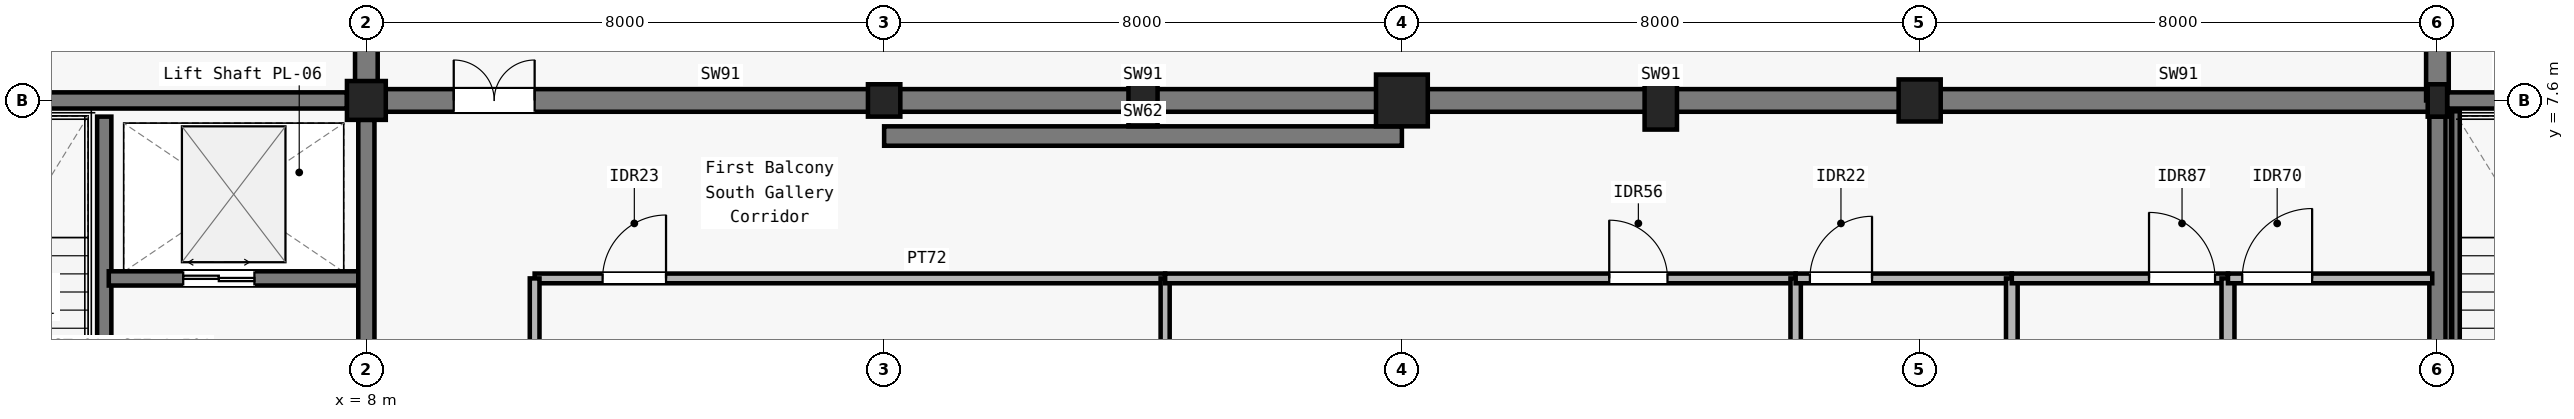
"""IFC4 building model, lengths in metres.
Left out: names, types, materials, properties, quantities, classifications, styles, units other than length and angle.
Written with IfcOpenShell. Run it as: python <this file> out.ifc"""

import sys

from ifc_helpers import new_model, si_unit, direction, frame, frame_2d, origin, origin_2d, place, context, subcontext, project, spatial, rectangle, circle, i_section, extrude, element, fill, save


model = new_model("IFC4")
c1 = context("Model", 3, precision=1e-05, world=origin(), true_north=direction((0.0, 1.0)))
c2 = subcontext(c1, "Body", "Model", "MODEL_VIEW")
j1 = project(units=[si_unit("LENGTHUNIT", "METRE"), si_unit("PLANEANGLEUNIT", "RADIAN")], contexts=[c1])
p1 = place(None, origin())
s1 = spatial("IfcSite", under=j1, at=p1, CompositionType="ELEMENT")
p2 = place(p1, origin())
s2 = spatial("IfcBuilding", under=s1, at=p2, CompositionType="ELEMENT")
p3 = place(p2, frame((0.0, 0.0, 5.4)))
s3 = spatial("IfcBuildingStorey", under=s2, at=p3, CompositionType="ELEMENT", Elevation=5.4)
p4 = place(p3, frame((8.0, 7.6, 0.0), z_axis=(0.0, 0.0, 1.0), x_axis=(1.0, 0.0, 0.0)))
e1 = element("IfcColumn", 1, at=p4, inside=s3, PredefinedType="COLUMN", context=c2, shape_type="SweptSolid", body=[
    extrude(rectangle(XDim=0.6, YDim=0.6, at=origin_2d()), origin(), (0.0, 0.0, 1.0), 4.8),
])
p5 = place(p3, frame((16.0, 7.6, 0.0), z_axis=(0.0, 0.0, 1.0), x_axis=(1.0, 0.0, 0.0)))
e2 = element("IfcColumn", 2, at=p5, inside=s3, PredefinedType="COLUMN", context=c2, shape_type="SweptSolid", body=[
    extrude(rectangle(XDim=0.5, YDim=0.5, at=origin_2d()), origin(), (0.0, 0.0, 1.0), 4.8),
])
p6 = place(p3, frame((24.0, 7.6, 0.0), z_axis=(0.0, 0.0, 1.0), x_axis=(1.0, 0.0, 0.0)))
e3 = element("IfcColumn", 3, at=p6, inside=s3, PredefinedType="COLUMN", context=c2, shape_type="SweptSolid", body=[
    extrude(circle(Radius=0.4, at=origin_2d()), origin(), (0.0, 0.0, 1.0), 4.8),
])
p7 = place(p3, frame((32.0, 7.6, 0.0), z_axis=(0.0, 0.0, 1.0), x_axis=(1.0, 0.0, 0.0)))
e4 = element("IfcColumn", 4, at=p7, inside=s3, PredefinedType="COLUMN", context=c2, shape_type="SweptSolid", body=[
    extrude(circle(Radius=0.325, at=origin_2d()), origin(), (0.0, 0.0, 1.0), 4.8),
])
p8 = place(p3, frame((40.0, 7.6, 0.0), z_axis=(0.0, 0.0, 1.0), x_axis=(1.0, 0.0, 0.0)))
e5 = element("IfcColumn", 5, at=p8, inside=s3, PredefinedType="COLUMN", context=c2, shape_type="SweptSolid", body=[
    extrude(i_section(OverallWidth=0.3, OverallDepth=0.5, WebThickness=0.014, FlangeThickness=0.028, FilletRadius=0.027, at=origin_2d()), origin(), (0.0, 0.0, 1.0), 4.8),
])
p9 = place(p3, frame((20.0, 7.6, 0.0), z_axis=(0.0, 0.0, 1.0), x_axis=(1.0, 0.0, 0.0)))
e6 = element("IfcColumn", 6, at=p9, inside=s3, PredefinedType="PILASTER", context=c2, shape_type="SweptSolid", body=[
    extrude(rectangle(XDim=0.45, YDim=0.8, at=origin_2d()), origin(), (0.0, 0.0, 1.0), 4.8),
])
p10 = place(p3, frame((28.0, 7.6, 0.0), z_axis=(0.0, 0.0, 1.0), x_axis=(1.0, 0.0, 0.0)))
e7 = element("IfcColumn", 7, at=p10, inside=s3, PredefinedType="PILASTER", context=c2, shape_type="SweptSolid", body=[
    extrude(rectangle(XDim=0.5, YDim=0.9, at=origin_2d()), origin(), (0.0, 0.0, 1.0), 4.8),
])
p11 = place(p3, frame((8.0, 7.6, 0.0), z_axis=(0.0, 0.0, 1.0), x_axis=(1.0, 0.0, 0.0)))
e8 = element("IfcWall", 8, at=p11, inside=s3, PredefinedType="SHEAR", context=c2, shape_type="SweptSolid", body=[
    extrude(rectangle(XDim=8.0, YDim=0.35, at=frame_2d((4.0, 0.0))), origin(), (0.0, 0.0, 1.0), 4.51),
])
p12 = place(p11, frame((1.35, 0.0, 0.0)))
e9 = element("IfcOpeningElement", 9, at=p12, cuts=e8, PredefinedType="OPENING", context=c2, shape_type="SweptSolid", body=[
    extrude(rectangle(XDim=1.25, YDim=2.2, at=frame_2d((0.625, 1.1))), frame((0.0, 0.185, 0.0), z_axis=(0.0, -1.0, 0.0), x_axis=(1.0, 0.0, 0.0)), (0.0, 0.0, 1.0), 0.37),
])
for number, where, z_axis, x_axis in (
    (10, (16.0, 7.6, 0.0), (0.0, 0.0, 1.0), (1.0, 0.0, 0.0)),
    (11, (24.0, 7.6, 0.0), (0.0, 0.0, 1.0), (1.0, 0.0, 0.0)),
    (12, (32.0, 7.6, 0.0), (0.0, 0.0, 1.0), (1.0, 0.0, 0.0)),
):
    element("IfcWall", number, at=place(p3, frame(where, z_axis=z_axis, x_axis=x_axis)), inside=s3, PredefinedType="SHEAR", context=c2, shape_type="SweptSolid", body=[
        extrude(rectangle(XDim=8.0, YDim=0.35, at=frame_2d((4.0, 0.0))), origin(), (0.0, 0.0, 1.0), 4.51),
    ])
for number, where, z_axis, x_axis in (
    (13, (8.0, 7.6, 0.0), (0.0, 0.0, 1.0), (0.0, 1.0, 0.0)),
    (14, (40.0, 7.6, 0.0), (0.0, 0.0, 1.0), (0.0, 1.0, 0.0)),
):
    element("IfcWall", number, at=place(p3, frame(where, z_axis=z_axis, x_axis=x_axis)), inside=s3, PredefinedType="SHEAR", context=c2, shape_type="SweptSolid", body=[
        extrude(rectangle(XDim=7.6, YDim=0.35, at=frame_2d((3.8, 0.0))), origin(), (0.0, 0.0, 1.0), 4.51),
    ])
p13 = place(p3, frame((16.0, 7.05, 0.0), z_axis=(0.0, 0.0, 1.0), x_axis=(1.0, 0.0, 0.0)))
e15 = element("IfcWall", 15, at=p13, inside=s3, PredefinedType="SHEAR", context=c2, shape_type="SweptSolid", body=[
    extrude(rectangle(XDim=8.0, YDim=0.3, at=frame_2d((4.0, 0.0))), origin(), (0.0, 0.0, 1.0), 4.51),
])
p14 = place(p3, frame((0.25, 7.6, 0.0), z_axis=(0.0, 0.0, 1.0), x_axis=(1.0, 0.0, 0.0)))
e16 = element("IfcWall", 16, at=p14, inside=s3, PredefinedType="SOLIDWALL", context=c2, shape_type="SweptSolid", body=[
    extrude(rectangle(XDim=7.45, YDim=0.25, at=frame_2d((3.725, 0.0))), origin(), (0.0, 0.0, 1.0), 3.76),
])
p15 = place(p3, frame((3.95, 0.25, 0.0), z_axis=(0.0, 0.0, 1.0), x_axis=(0.0, 1.0, 0.0)))
e17 = element("IfcWall", 17, at=p15, inside=s3, PredefinedType="SOLIDWALL", context=c2, shape_type="SweptSolid", body=[
    extrude(rectangle(XDim=7.1, YDim=0.22, at=frame_2d((3.55, 0.0))), origin(), (0.0, 0.0, 1.0), 4.51),
])
p16 = place(p15, frame((0.35, 0.0, 0.0)))
e18 = element("IfcOpeningElement", 18, at=p16, cuts=e17, PredefinedType="OPENING", context=c2, shape_type="SweptSolid", body=[
    extrude(rectangle(XDim=1.2, YDim=2.15, at=frame_2d((0.6, 1.075))), frame((0.0, 0.12, 0.0), z_axis=(0.0, -1.0, 0.0), x_axis=(1.0, 0.0, 0.0)), (0.0, 0.0, 1.0), 0.24),
])
p17 = place(p3, frame((4.02, 4.85, 0.0), z_axis=(0.0, 0.0, 1.0), x_axis=(1.0, 0.0, 0.0)))
e19 = element("IfcWall", 19, at=p17, inside=s3, PredefinedType="SOLIDWALL", context=c2, shape_type="SweptSolid", body=[
    extrude(rectangle(XDim=3.93, YDim=0.22, at=frame_2d((1.965, 0.0))), origin(), (0.0, 0.0, 1.0), 3.885),
])
p18 = place(p17, frame((1.15, 0.0, 0.0)))
e20 = element("IfcOpeningElement", 20, at=p18, cuts=e19, PredefinedType="OPENING", context=c2, shape_type="SweptSolid", body=[
    extrude(rectangle(XDim=1.1, YDim=2.2, at=frame_2d((0.55, 1.1))), frame((0.0, 0.12, 0.0), z_axis=(0.0, -1.0, 0.0), x_axis=(1.0, 0.0, 0.0)), (0.0, 0.0, 1.0), 0.24),
])
p19 = place(p3, frame((8.0, 0.375, 0.0), z_axis=(0.0, 0.0, 1.0), x_axis=(0.0, 1.0, 0.0)))
e21 = element("IfcWall", 21, at=p19, inside=s3, PredefinedType="SOLIDWALL", context=c2, shape_type="SweptSolid", body=[
    extrude(rectangle(XDim=6.925, YDim=0.25, at=frame_2d((3.462, 0.0))), origin(), (0.0, 0.0, 1.0), 3.84),
])
p20 = place(p19, frame((1.975, 0.0, 0.0)))
e22 = element("IfcOpeningElement", 22, at=p20, cuts=e21, PredefinedType="OPENING", context=c2, shape_type="SweptSolid", body=[
    extrude(rectangle(XDim=1.35, YDim=2.2, at=frame_2d((0.675, 1.1))), frame((0.0, 0.135, 0.0), z_axis=(0.0, -1.0, 0.0), x_axis=(1.0, 0.0, 0.0)), (0.0, 0.0, 1.0), 0.27),
])
p21 = place(p3, frame((40.0, 0.25, 0.0), z_axis=(0.0, 0.0, 1.0), x_axis=(0.0, 1.0, 0.0)))
e23 = element("IfcWall", 23, at=p21, inside=s3, PredefinedType="SOLIDWALL", context=c2, shape_type="SweptSolid", body=[
    extrude(rectangle(XDim=7.1, YDim=0.25, at=frame_2d((3.55, 0.0))), origin(), (0.0, 0.0, 1.0), 3.4),
])
p22 = place(p3, frame((40.15, 7.6, 0.0), z_axis=(0.0, 0.0, 1.0), x_axis=(1.0, 0.0, 0.0)))
e24 = element("IfcWall", 24, at=p22, inside=s3, PredefinedType="SOLIDWALL", context=c2, shape_type="SweptSolid", body=[
    extrude(rectangle(XDim=7.77, YDim=0.25, at=frame_2d((3.885, 0.0))), origin(), (0.0, 0.0, 1.0), 3.4),
])
p23 = place(p3, frame((10.6, 4.85, 0.0), z_axis=(0.0, 0.0, 1.0), x_axis=(1.0, 0.0, 0.0)))
e25 = element("IfcWall", 25, at=p23, inside=s3, PredefinedType="PARTITIONING", context=c2, shape_type="SweptSolid", body=[
    extrude(rectangle(XDim=9.742, YDim=0.15, at=frame_2d((4.871, 0.0))), origin(), (0.0, 0.0, 1.0), 3.865),
])
p24 = place(p23, frame((1.05, 0.0, 0.0)))
e26 = element("IfcOpeningElement", 26, at=p24, cuts=e25, PredefinedType="OPENING", context=c2, shape_type="SweptSolid", body=[
    extrude(rectangle(XDim=0.98, YDim=2.05, at=frame_2d((0.49, 1.025))), frame((0.0, 0.085, 0.0), z_axis=(0.0, -1.0, 0.0), x_axis=(1.0, 0.0, 0.0)), (0.0, 0.0, 1.0), 0.17),
])
p25 = place(p3, frame((20.342, 0.08, 0.0), z_axis=(0.0, 0.0, 1.0), x_axis=(0.0, 1.0, 0.0)))
e27 = element("IfcWall", 27, at=p25, inside=s3, PredefinedType="PARTITIONING", context=c2, shape_type="SweptSolid", body=[
    extrude(rectangle(XDim=4.77, YDim=0.14, at=frame_2d((2.385, 0.0))), origin(), (0.0, 0.0, 1.0), 3.76),
])
p26 = place(p3, frame((20.342, 4.85, 0.0), z_axis=(0.0, 0.0, 1.0), x_axis=(1.0, 0.0, 0.0)))
e28 = element("IfcWall", 28, at=p26, inside=s3, PredefinedType="PARTITIONING", context=c2, shape_type="SweptSolid", body=[
    extrude(rectangle(XDim=9.742, YDim=0.15, at=frame_2d((4.871, 0.0))), origin(), (0.0, 0.0, 1.0), 3.84),
])
p27 = place(p26, frame((6.862, 0.0, 0.0)))
e29 = element("IfcOpeningElement", 29, at=p27, cuts=e28, PredefinedType="OPENING", context=c2, shape_type="SweptSolid", body=[
    extrude(rectangle(XDim=0.9, YDim=2.1, at=frame_2d((0.45, 1.05))), frame((0.0, 0.085, 0.0), z_axis=(0.0, -1.0, 0.0), x_axis=(1.0, 0.0, 0.0)), (0.0, 0.0, 1.0), 0.17),
])
p28 = place(p3, frame((30.084, 0.08, 0.0), z_axis=(0.0, 0.0, 1.0), x_axis=(0.0, 1.0, 0.0)))
e30 = element("IfcWall", 30, at=p28, inside=s3, PredefinedType="PARTITIONING", context=c2, shape_type="SweptSolid", body=[
    extrude(rectangle(XDim=4.77, YDim=0.16, at=frame_2d((2.385, 0.0))), origin(), (0.0, 0.0, 1.0), 3.735),
])
p29 = place(p3, frame((30.084, 4.85, 0.0), z_axis=(0.0, 0.0, 1.0), x_axis=(1.0, 0.0, 0.0)))
e31 = element("IfcWall", 31, at=p29, inside=s3, PredefinedType="PARTITIONING", context=c2, shape_type="SweptSolid", body=[
    extrude(rectangle(XDim=3.34, YDim=0.15, at=frame_2d((1.67, 0.0))), origin(), (0.0, 0.0, 1.0), 3.735),
])
p30 = place(p29, frame((0.22, 0.0, 0.0)))
e32 = element("IfcOpeningElement", 32, at=p30, cuts=e31, PredefinedType="OPENING", context=c2, shape_type="SweptSolid", body=[
    extrude(rectangle(XDim=0.96, YDim=2.1, at=frame_2d((0.48, 1.05))), frame((0.0, 0.085, 0.0), z_axis=(0.0, -1.0, 0.0), x_axis=(1.0, 0.0, 0.0)), (0.0, 0.0, 1.0), 0.17),
])
p31 = place(p3, frame((33.424, 0.08, 0.0), z_axis=(0.0, 0.0, 1.0), x_axis=(0.0, 1.0, 0.0)))
e33 = element("IfcWall", 33, at=p31, inside=s3, PredefinedType="PARTITIONING", context=c2, shape_type="SweptSolid", body=[
    extrude(rectangle(XDim=4.77, YDim=0.18, at=frame_2d((2.385, 0.0))), origin(), (0.0, 0.0, 1.0), 3.905),
])
p32 = place(p3, frame((33.424, 4.85, 0.0), z_axis=(0.0, 0.0, 1.0), x_axis=(1.0, 0.0, 0.0)))
e34 = element("IfcWall", 34, at=p32, inside=s3, PredefinedType="PARTITIONING", context=c2, shape_type="SweptSolid", body=[
    extrude(rectangle(XDim=3.34, YDim=0.15, at=frame_2d((1.67, 0.0))), origin(), (0.0, 0.0, 1.0), 3.895),
])
p33 = place(p32, frame((2.12, 0.0, 0.0)))
e35 = element("IfcOpeningElement", 35, at=p33, cuts=e34, PredefinedType="OPENING", context=c2, shape_type="SweptSolid", body=[
    extrude(rectangle(XDim=1.02, YDim=2.1, at=frame_2d((0.51, 1.05))), frame((0.0, 0.085, 0.0), z_axis=(0.0, -1.0, 0.0), x_axis=(1.0, 0.0, 0.0)), (0.0, 0.0, 1.0), 0.17),
])
p34 = place(p3, frame((36.764, 0.08, 0.0), z_axis=(0.0, 0.0, 1.0), x_axis=(0.0, 1.0, 0.0)))
e36 = element("IfcWall", 36, at=p34, inside=s3, PredefinedType="PARTITIONING", context=c2, shape_type="SweptSolid", body=[
    extrude(rectangle(XDim=4.77, YDim=0.2, at=frame_2d((2.385, 0.0))), origin(), (0.0, 0.0, 1.0), 3.905),
])
p35 = place(p3, frame((36.764, 4.85, 0.0), z_axis=(0.0, 0.0, 1.0), x_axis=(1.0, 0.0, 0.0)))
e37 = element("IfcWall", 37, at=p35, inside=s3, PredefinedType="PARTITIONING", context=c2, shape_type="SweptSolid", body=[
    extrude(rectangle(XDim=3.156, YDim=0.15, at=frame_2d((1.578, 0.0))), origin(), (0.0, 0.0, 1.0), 3.685),
])
p36 = place(p35, frame((0.22, 0.0, 0.0)))
e38 = element("IfcOpeningElement", 38, at=p36, cuts=e37, PredefinedType="OPENING", context=c2, shape_type="SweptSolid", body=[
    extrude(rectangle(XDim=1.08, YDim=2.1, at=frame_2d((0.54, 1.05))), frame((0.0, 0.085, 0.0), z_axis=(0.0, -1.0, 0.0), x_axis=(1.0, 0.0, 0.0)), (0.0, 0.0, 1.0), 0.17),
])
p37 = place(p3, frame((10.6, 0.08, 0.0), z_axis=(0.0, 0.0, 1.0), x_axis=(0.0, 1.0, 0.0)))
e39 = element("IfcWall", 39, at=p37, inside=s3, PredefinedType="PARTITIONING", context=c2, shape_type="SweptSolid", body=[
    extrude(rectangle(XDim=4.77, YDim=0.15, at=frame_2d((2.385, 0.0))), origin(), (0.0, 0.0, 1.0), 3.88),
])
p38 = place(p3, frame((40.275, 0.15, 0.0), z_axis=(0.0, 0.0, 1.0), x_axis=(0.0, 1.0, 0.0)))
e40 = element("IfcWall", 40, at=p38, inside=s3, PredefinedType="SOLIDWALL", context=c2, shape_type="SweptSolid", body=[
    extrude(rectangle(XDim=7.3, YDim=0.14, at=frame_2d((3.65, 0.0))), origin(), (0.0, 0.0, 1.0), 4.51),
])
p39 = place(p18, origin())
e41 = element("IfcDoor", 41, at=p39, inside=s3, OperationType="DOUBLE_DOOR_SLIDING", PredefinedType="DOOR", context=c2, shape_type="SweptSolid", body=[
    extrude(rectangle(XDim=1.1, YDim=2.2, at=frame_2d((0.55, 1.1))), frame((0.0, 0.025, 0.0), z_axis=(0.0, -1.0, 0.0), x_axis=(1.0, 0.0, 0.0)), (0.0, 0.0, 1.0), 0.05),
])
fill(e20, e41)
p40 = place(p24, origin())
e42 = element("IfcDoor", 42, at=p40, inside=s3, OperationType="SINGLE_SWING_RIGHT", PredefinedType="DOOR", context=c2, shape_type="SweptSolid", body=[
    extrude(rectangle(XDim=0.98, YDim=2.05, at=frame_2d((0.49, 1.025))), frame((0.0, 0.025, 0.0), z_axis=(0.0, -1.0, 0.0), x_axis=(1.0, 0.0, 0.0)), (0.0, 0.0, 1.0), 0.05),
])
fill(e26, e42)
p41 = place(p27, origin())
e43 = element("IfcDoor", 43, at=p41, inside=s3, OperationType="SINGLE_SWING_LEFT", PredefinedType="DOOR", context=c2, shape_type="SweptSolid", body=[
    extrude(rectangle(XDim=0.9, YDim=2.1, at=frame_2d((0.45, 1.05))), frame((0.0, 0.025, 0.0), z_axis=(0.0, -1.0, 0.0), x_axis=(1.0, 0.0, 0.0)), (0.0, 0.0, 1.0), 0.05),
])
fill(e29, e43)
p42 = place(p30, origin())
e44 = element("IfcDoor", 44, at=p42, inside=s3, OperationType="SINGLE_SWING_RIGHT", PredefinedType="DOOR", context=c2, shape_type="SweptSolid", body=[
    extrude(rectangle(XDim=0.96, YDim=2.1, at=frame_2d((0.48, 1.05))), frame((0.0, 0.025, 0.0), z_axis=(0.0, -1.0, 0.0), x_axis=(1.0, 0.0, 0.0)), (0.0, 0.0, 1.0), 0.05),
])
fill(e32, e44)
p43 = place(p33, origin())
e45 = element("IfcDoor", 45, at=p43, inside=s3, OperationType="SINGLE_SWING_LEFT", PredefinedType="DOOR", context=c2, shape_type="SweptSolid", body=[
    extrude(rectangle(XDim=1.02, YDim=2.1, at=frame_2d((0.51, 1.05))), frame((0.0, 0.025, 0.0), z_axis=(0.0, -1.0, 0.0), x_axis=(1.0, 0.0, 0.0)), (0.0, 0.0, 1.0), 0.05),
])
fill(e35, e45)
p44 = place(p36, origin())
e46 = element("IfcDoor", 46, at=p44, inside=s3, OperationType="SINGLE_SWING_RIGHT", PredefinedType="DOOR", context=c2, shape_type="SweptSolid", body=[
    extrude(rectangle(XDim=1.08, YDim=2.1, at=frame_2d((0.54, 1.05))), frame((0.0, 0.025, 0.0), z_axis=(0.0, -1.0, 0.0), x_axis=(1.0, 0.0, 0.0)), (0.0, 0.0, 1.0), 0.05),
])
fill(e38, e46)
p45 = place(p12, origin())
e47 = element("IfcDoor", 47, at=p45, inside=s3, OperationType="DOUBLE_DOOR_SINGLE_SWING", PredefinedType="DOOR", context=c2, shape_type="SweptSolid", body=[
    extrude(rectangle(XDim=1.25, YDim=2.2, at=frame_2d((0.625, 1.1))), frame((0.0, 0.025, 0.0), z_axis=(0.0, -1.0, 0.0), x_axis=(1.0, 0.0, 0.0)), (0.0, 0.0, 1.0), 0.05),
])
fill(e9, e47)
save(model, sys.argv[1])
